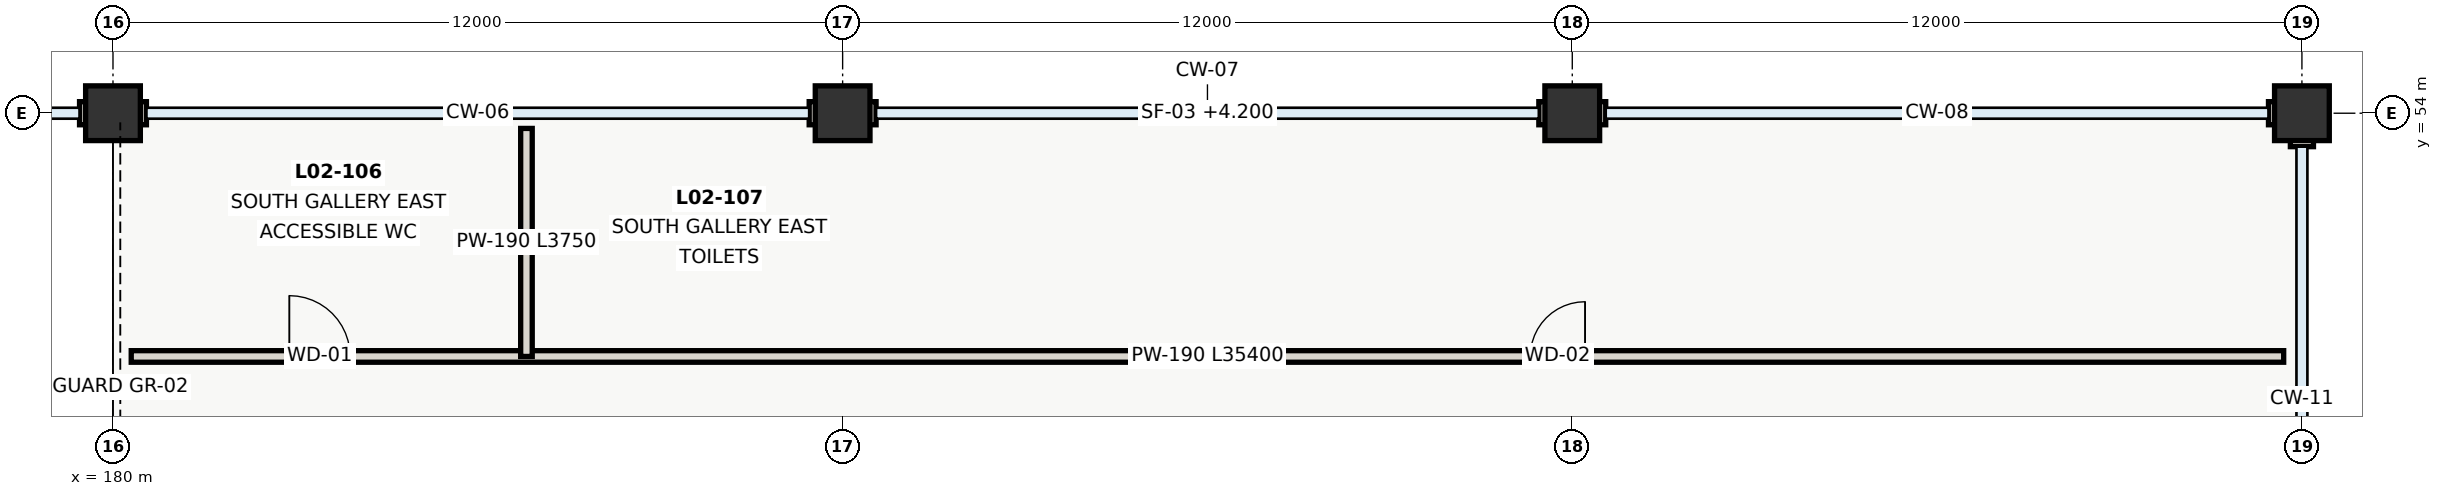
"""IFC4 building model, lengths in metres.
Left out: names, types, materials, properties, quantities, classifications, styles, units other than length and angle.
Written with IfcOpenShell. Run it as: python <this file> out.ifc"""

import sys

from ifc_helpers import new_model, si_unit, direction, frame, frame_2d, origin, origin_2d, place, context, subcontext, project, spatial, rectangle, extrude, element, fill, save


model = new_model("IFC4")
c1 = context("Model", 3, precision=1e-05, world=origin(), true_north=direction((0.0, 1.0)))
c2 = subcontext(c1, "Body", "Model", "MODEL_VIEW")
j1 = project(units=[si_unit("LENGTHUNIT", "METRE"), si_unit("PLANEANGLEUNIT", "RADIAN")], contexts=[c1])
p1 = place(None, origin())
s1 = spatial("IfcSite", under=j1, at=p1, CompositionType="ELEMENT")
p2 = place(p1, origin())
s2 = spatial("IfcBuilding", under=s1, at=p2, CompositionType="ELEMENT")
p3 = place(p2, frame((0.0, 0.0, 4.2)))
s3 = spatial("IfcBuildingStorey", under=s2, at=p3, CompositionType="ELEMENT", Elevation=4.2)
for number, where, z_axis, x_axis in (
    (1, (180.0, 54.0, 0.0), (0.0, 0.0, 1.0), (1.0, 0.0, 0.0)),
    (2, (192.0, 54.0, 0.0), (0.0, 0.0, 1.0), (1.0, 0.0, 0.0)),
    (3, (204.0, 54.0, 0.0), (0.0, 0.0, 1.0), (1.0, 0.0, 0.0)),
    (4, (216.0, 54.0, 0.0), (0.0, 0.0, 1.0), (1.0, 0.0, 0.0)),
):
    element("IfcColumn", number, at=place(p3, frame(where, z_axis=z_axis, x_axis=x_axis)), inside=s3, PredefinedType="COLUMN", context=c2, shape_type="SweptSolid", body=[
        extrude(rectangle(XDim=0.9, YDim=0.9, at=origin_2d()), origin(), (0.0, 0.0, 1.0), 4.2),
    ])
p4 = place(p3, frame((179.45, 54.0, 0.0), z_axis=(0.0, 0.0, 1.0), x_axis=(1.0, 0.0, 0.0)))
e5 = element("IfcWall", 5, at=p4, inside=s3, PredefinedType="SOLIDWALL", context=c2, shape_type="SweptSolid", body=[
    extrude(rectangle(XDim=0.55, YDim=0.38, at=frame_2d((0.275, 0.0))), origin(), (0.0, 0.0, 1.0), 3.56),
])
p5 = place(p3, frame((180.002, 54.0, 0.0), z_axis=(0.0, 0.0, 1.0), x_axis=(1.0, 0.0, 0.0)))
e6 = element("IfcWall", 6, at=p5, inside=s3, PredefinedType="SOLIDWALL", context=c2, shape_type="SweptSolid", body=[
    extrude(rectangle(XDim=0.548, YDim=0.38, at=frame_2d((0.274, 0.0))), origin(), (0.0, 0.0, 1.0), 3.56),
])
p6 = place(p3, frame((191.45, 54.0, 0.0), z_axis=(0.0, 0.0, 1.0), x_axis=(1.0, 0.0, 0.0)))
e7 = element("IfcWall", 7, at=p6, inside=s3, PredefinedType="SOLIDWALL", context=c2, shape_type="SweptSolid", body=[
    extrude(rectangle(XDim=0.55, YDim=0.38, at=frame_2d((0.275, 0.0))), origin(), (0.0, 0.0, 1.0), 3.56),
])
p7 = place(p3, frame((192.002, 54.0, 0.0), z_axis=(0.0, 0.0, 1.0), x_axis=(1.0, 0.0, 0.0)))
e8 = element("IfcWall", 8, at=p7, inside=s3, PredefinedType="SOLIDWALL", context=c2, shape_type="SweptSolid", body=[
    extrude(rectangle(XDim=0.548, YDim=0.38, at=frame_2d((0.274, 0.0))), origin(), (0.0, 0.0, 1.0), 3.56),
])
p8 = place(p3, frame((203.45, 54.0, 0.0), z_axis=(0.0, 0.0, 1.0), x_axis=(1.0, 0.0, 0.0)))
e9 = element("IfcWall", 9, at=p8, inside=s3, PredefinedType="SOLIDWALL", context=c2, shape_type="SweptSolid", body=[
    extrude(rectangle(XDim=0.55, YDim=0.38, at=frame_2d((0.275, 0.0))), origin(), (0.0, 0.0, 1.0), 3.56),
])
p9 = place(p3, frame((204.002, 54.0, 0.0), z_axis=(0.0, 0.0, 1.0), x_axis=(1.0, 0.0, 0.0)))
e10 = element("IfcWall", 10, at=p9, inside=s3, PredefinedType="SOLIDWALL", context=c2, shape_type="SweptSolid", body=[
    extrude(rectangle(XDim=0.548, YDim=0.38, at=frame_2d((0.274, 0.0))), origin(), (0.0, 0.0, 1.0), 3.56),
])
p10 = place(p3, frame((215.45, 54.0, 0.0), z_axis=(0.0, 0.0, 1.0), x_axis=(1.0, 0.0, 0.0)))
e11 = element("IfcWall", 11, at=p10, inside=s3, PredefinedType="SOLIDWALL", context=c2, shape_type="SweptSolid", body=[
    extrude(rectangle(XDim=0.55, YDim=0.38, at=frame_2d((0.275, 0.0))), origin(), (0.0, 0.0, 1.0), 3.56),
])
p11 = place(p3, frame((216.0, 53.808, 0.0), z_axis=(0.0, 0.0, 1.0), x_axis=(0.0, -1.0, 0.0)))
e12 = element("IfcWall", 12, at=p11, inside=s3, PredefinedType="SOLIDWALL", context=c2, shape_type="SweptSolid", body=[
    extrude(rectangle(XDim=0.358, YDim=0.38, at=frame_2d((0.179, 0.0))), origin(), (0.0, 0.0, 1.0), 3.48),
])
p12 = place(p3, frame((180.3, 50.0, 0.0), z_axis=(0.0, 0.0, 1.0), x_axis=(1.0, 0.0, 0.0)))
e13 = element("IfcWall", 13, at=p12, inside=s3, PredefinedType="PLUMBINGWALL", context=c2, shape_type="SweptSolid", body=[
    extrude(rectangle(XDim=35.4, YDim=0.19, at=frame_2d((17.7, 0.0))), origin(), (0.0, 0.0, 1.0), 3.72),
])
p13 = place(p12, frame((2.6, 0.0, 0.0)))
e14 = element("IfcOpeningElement", 14, at=p13, cuts=e13, PredefinedType="OPENING", context=c2, shape_type="SweptSolid", body=[
    extrude(rectangle(XDim=1.0, YDim=2.1, at=frame_2d((0.5, 1.05))), frame((0.0, 0.105, 0.0), z_axis=(0.0, -1.0, 0.0), x_axis=(1.0, 0.0, 0.0)), (0.0, 0.0, 1.0), 0.21),
])
p14 = place(p12, frame((23.01, 0.0, 0.0)))
e15 = element("IfcOpeningElement", 15, at=p14, cuts=e13, PredefinedType="OPENING", context=c2, shape_type="SweptSolid", body=[
    extrude(rectangle(XDim=0.9, YDim=2.05, at=frame_2d((0.45, 1.025))), frame((0.0, 0.105, 0.0), z_axis=(0.0, -1.0, 0.0), x_axis=(1.0, 0.0, 0.0)), (0.0, 0.0, 1.0), 0.21),
])
p15 = place(p3, frame((186.8, 50.0, 0.0), z_axis=(0.0, 0.0, 1.0), x_axis=(0.0, 1.0, 0.0)))
e16 = element("IfcWall", 16, at=p15, inside=s3, PredefinedType="PLUMBINGWALL", context=c2, shape_type="SweptSolid", body=[
    extrude(rectangle(XDim=3.75, YDim=0.19, at=frame_2d((1.875, 0.0))), origin(), (0.0, 0.0, 1.0), 3.72),
])
p16 = place(p13, origin())
e17 = element("IfcDoor", 17, at=p16, inside=s3, OperationType="SINGLE_SWING_LEFT", PredefinedType="DOOR", context=c2, shape_type="SweptSolid", body=[
    extrude(rectangle(XDim=1.0, YDim=2.1, at=frame_2d((0.5, 1.05))), frame((0.0, 0.025, 0.0), z_axis=(0.0, -1.0, 0.0), x_axis=(1.0, 0.0, 0.0)), (0.0, 0.0, 1.0), 0.05),
])
fill(e14, e17)
p17 = place(p14, origin())
e18 = element("IfcDoor", 18, at=p17, inside=s3, OperationType="SINGLE_SWING_RIGHT", PredefinedType="DOOR", context=c2, shape_type="SweptSolid", body=[
    extrude(rectangle(XDim=0.9, YDim=2.05, at=frame_2d((0.45, 1.025))), frame((0.0, 0.025, 0.0), z_axis=(0.0, -1.0, 0.0), x_axis=(1.0, 0.0, 0.0)), (0.0, 0.0, 1.0), 0.05),
])
fill(e15, e18)
save(model, sys.argv[1])
